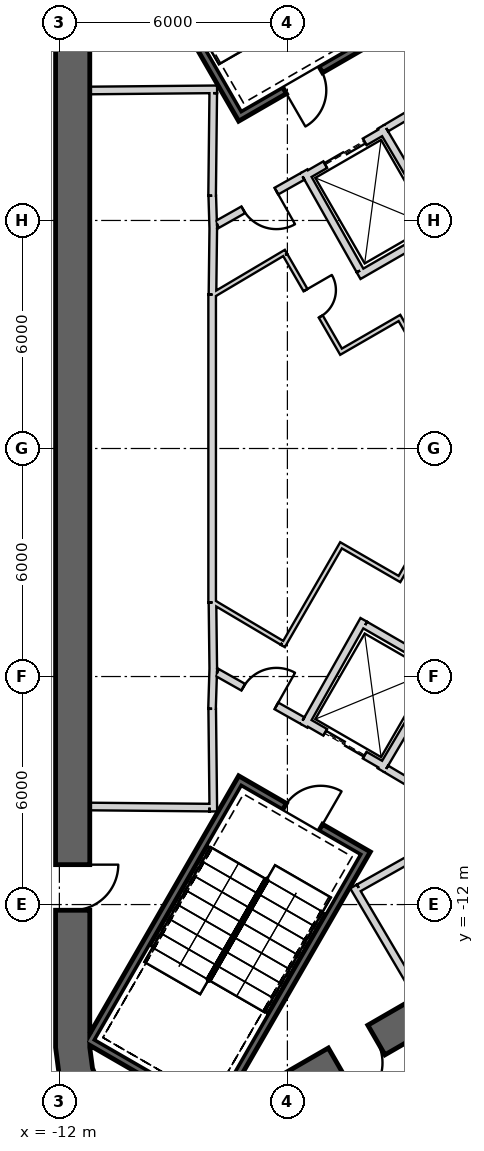
"""IFC4 building model, lengths in metres.
Left out: names, types, materials, properties, quantities, classifications, styles, units other than length and angle.
Written with IfcOpenShell. Run it as: python <this file> out.ifc"""

import sys

from ifc_helpers import new_model, si_unit, direction, frame, frame_2d, origin, place, context, subcontext, project, spatial, polyline, rectangle, outline, extrude, element, fill, save


model = new_model("IFC4")
c1 = context("Model", 3, precision=1e-05, world=origin(), true_north=direction((0.0, 1.0)))
c2 = subcontext(c1, "Body", "Model", "MODEL_VIEW")
j1 = project(units=[si_unit("LENGTHUNIT", "METRE"), si_unit("PLANEANGLEUNIT", "RADIAN")], contexts=[c1])
p1 = place(None, origin())
s1 = spatial("IfcSite", under=j1, at=p1, CompositionType="ELEMENT")
p2 = place(p1, origin())
s2 = spatial("IfcBuilding", under=s1, at=p2, CompositionType="ELEMENT")
p3 = place(p2, frame((0.0, 0.0, 39.5)))
s3 = spatial("IfcBuildingStorey", under=s2, at=p3, CompositionType="ELEMENT", Elevation=39.5)
p4 = place(p3, frame((19.475, 2.208, 0.0), z_axis=(0.0, 0.0, 1.0), x_axis=(-0.866028369851, 0.499994862586, 0.0)))
e1 = element("IfcWall", 1, at=p4, inside=s3, PredefinedType="SHEAR", context=c2, shape_type="SweptSolid", body=[
    extrude(rectangle(XDim=31.523, YDim=0.9, at=frame_2d((15.762, 0.0))), origin(), (0.0, 0.0, 1.0), 6.0),
])
p5 = place(p4, frame((3.612, 0.0, 0.0)))
e2 = element("IfcOpeningElement", 2, at=p5, cuts=e1, PredefinedType="OPENING", context=c2, shape_type="SweptSolid", body=[
    extrude(rectangle(XDim=1.2, YDim=2.4, at=frame_2d((0.6, 1.2))), frame((0.0, 0.46, 0.0), z_axis=(0.0, -1.0, 0.0), x_axis=(1.0, 0.0, 0.0)), (0.0, 0.0, 1.0), 0.92),
])
p6 = place(p4, frame((26.712, 0.0, 0.0)))
e3 = element("IfcOpeningElement", 3, at=p6, cuts=e1, PredefinedType="OPENING", context=c2, shape_type="SweptSolid", body=[
    extrude(rectangle(XDim=1.2, YDim=2.4, at=frame_2d((0.6, 1.2))), frame((0.0, 0.46, 0.0), z_axis=(0.0, -1.0, 0.0), x_axis=(1.0, 0.0, 0.0)), (0.0, 0.0, 1.0), 0.92),
])
p7 = place(p3, frame((-11.65, 15.762, 0.0), z_axis=(0.0, 0.0, 1.0), x_axis=(0.0, -1.0, 0.0)))
e4 = element("IfcWall", 4, at=p7, inside=s3, PredefinedType="SHEAR", context=c2, shape_type="SweptSolid", body=[
    extrude(rectangle(XDim=31.523, YDim=0.9, at=frame_2d((15.762, 0.0))), origin(), (0.0, 0.0, 1.0), 6.0),
])
p8 = place(p7, frame((3.612, 0.0, 0.0)))
e5 = element("IfcOpeningElement", 5, at=p8, cuts=e4, PredefinedType="OPENING", context=c2, shape_type="SweptSolid", body=[
    extrude(rectangle(XDim=1.2, YDim=2.4, at=frame_2d((0.6, 1.2))), frame((0.0, 0.46, 0.0), z_axis=(0.0, -1.0, 0.0), x_axis=(1.0, 0.0, 0.0)), (0.0, 0.0, 1.0), 0.92),
])
p9 = place(p7, frame((26.712, 0.0, 0.0)))
e6 = element("IfcOpeningElement", 6, at=p9, cuts=e4, PredefinedType="OPENING", context=c2, shape_type="SweptSolid", body=[
    extrude(rectangle(XDim=1.2, YDim=2.4, at=frame_2d((0.6, 1.2))), frame((0.0, 0.46, 0.0), z_axis=(0.0, -1.0, 0.0), x_axis=(1.0, 0.0, 0.0)), (0.0, 0.0, 1.0), 0.92),
])
p10 = place(p3, frame((-7.825, -17.97, 0.0), z_axis=(0.0, 0.0, 1.0), x_axis=(0.866028369851, 0.499994862586, 0.0)))
e7 = element("IfcWall", 7, at=p10, inside=s3, PredefinedType="SHEAR", context=c2, shape_type="SweptSolid", body=[
    extrude(rectangle(XDim=31.523, YDim=0.9, at=frame_2d((15.762, 0.0))), origin(), (0.0, 0.0, 1.0), 6.0),
])
p11 = place(p10, frame((26.712, 0.0, 0.0)))
e8 = element("IfcOpeningElement", 8, at=p11, cuts=e7, PredefinedType="OPENING", context=c2, shape_type="SweptSolid", body=[
    extrude(rectangle(XDim=1.2, YDim=2.4, at=frame_2d((0.6, 1.2))), frame((0.0, 0.46, 0.0), z_axis=(0.0, -1.0, 0.0), x_axis=(1.0, 0.0, 0.0)), (0.0, 0.0, 1.0), 0.92),
])
p12 = place(p10, frame((3.612, 0.0, 0.0)))
e9 = element("IfcOpeningElement", 9, at=p12, cuts=e7, PredefinedType="OPENING", context=c2, shape_type="SweptSolid", body=[
    extrude(rectangle(XDim=1.2, YDim=2.4, at=frame_2d((0.6, 1.2))), frame((0.0, 0.46, 0.0), z_axis=(0.0, -1.0, 0.0), x_axis=(1.0, 0.0, 0.0)), (0.0, 0.0, 1.0), 0.92),
])
p13 = place(p3, origin())
e10 = element("IfcWall", 10, at=p13, inside=s3, PredefinedType="SHEAR", context=c2, shape_type="SweptSolid", body=[
    extrude(outline(polyline([(-12.1, -15.762), (-11.998, -16.538), (-11.698, -17.262), (-11.221, -17.883), (-10.6, -18.36), (-9.876, -18.659), (-9.1, -18.762), (-8.323, -18.659), (-7.6, -18.36), (-8.05, -17.58), (-8.556, -17.79), (-9.1, -17.862), (-9.644, -17.79), (-10.15, -17.58), (-10.585, -17.247), (-10.919, -16.812), (-11.128, -16.305), (-11.2, -15.762), (-12.1, -15.762)])), origin(), (0.0, 0.0, 1.0), 6.0),
])
p14 = place(p3, frame((-4.859, -32.954, 0.0), z_axis=(0.0, 0.0, 1.0), x_axis=(0.865991780246, 0.500058233156, 0.0)))
e11 = element("IfcWall", 11, at=p14, inside=s3, PredefinedType="SOLIDWALL", context=c2, shape_type="SweptSolid", body=[
    extrude(rectangle(XDim=41.371, YDim=0.24, at=frame_2d((20.685, 0.0))), origin(), (0.0, 0.0, 1.0), 5.7),
])
p15 = place(p3, frame((-11.2, 9.42, 0.0), z_axis=(0.0, 0.0, 1.0), x_axis=(0.999957167047, 0.009255488683, 0.0)))
e12 = element("IfcWall", 12, at=p15, inside=s3, PredefinedType="PLUMBINGWALL", context=c2, shape_type="SweptSolid", body=[
    extrude(rectangle(XDim=3.35, YDim=0.2, at=frame_2d((1.675, 0.0))), origin(), (0.0, 0.0, 1.0), 5.7),
])
p16 = place(p3, frame((-7.951, 9.35, 0.0), z_axis=(0.0, 0.0, 1.0), x_axis=(-0.011120469654, -0.999938165666, 0.0)))
e13 = element("IfcWall", 13, at=p16, inside=s3, PredefinedType="PLUMBINGWALL", context=c2, shape_type="SweptSolid", body=[
    extrude(rectangle(XDim=2.7, YDim=0.2, at=frame_2d((1.35, 0.0))), origin(), (0.0, 0.0, 1.0), 5.7),
])
p17 = place(p3, frame((-7.977, 6.65, 0.0), z_axis=(0.0, 0.0, 1.0), x_axis=(0.030861509705, -0.999523670164, 0.0)))
e14 = element("IfcWall", 14, at=p17, inside=s3, PredefinedType="PLUMBINGWALL", context=c2, shape_type="SweptSolid", body=[
    extrude(rectangle(XDim=0.878, YDim=0.2, at=frame_2d((0.439, 0.0))), origin(), (0.0, 0.0, 1.0), 5.7),
])
p18 = place(p3, frame((-7.949, 5.895, 0.0), z_axis=(0.0, 0.0, 1.0), x_axis=(-0.012042535896, -0.999927486035, 0.0)))
e15 = element("IfcWall", 15, at=p18, inside=s3, PredefinedType="PLUMBINGWALL", context=c2, shape_type="SweptSolid", body=[
    extrude(rectangle(XDim=1.845, YDim=0.2, at=frame_2d((0.922, 0.0))), origin(), (0.0, 0.0, 1.0), 5.7),
])
p19 = place(p3, frame((-7.98, 4.05, 0.0), z_axis=(0.0, 0.0, 1.0), x_axis=(0.0, -1.0, 0.0)))
e16 = element("IfcWall", 16, at=p19, inside=s3, PredefinedType="PLUMBINGWALL", context=c2, shape_type="SweptSolid", body=[
    extrude(rectangle(XDim=8.1, YDim=0.2, at=frame_2d((4.05, 0.0))), origin(), (0.0, 0.0, 1.0), 5.7),
])
p20 = place(p3, frame((-7.95, -5.772, 0.0), z_axis=(0.0, 0.0, 1.0), x_axis=(-0.030803413295, -0.999525462272, 0.0)))
e17 = element("IfcWall", 17, at=p20, inside=s3, PredefinedType="PLUMBINGWALL", context=c2, shape_type="SweptSolid", body=[
    extrude(rectangle(XDim=1.078, YDim=0.2, at=frame_2d((0.539, 0.0))), origin(), (0.0, 0.0, 1.0), 5.7),
])
p21 = place(p3, frame((-7.971, -4.05, 0.0), z_axis=(0.0, 0.0, 1.0), x_axis=(0.012042535896, -0.999927486035, 0.0)))
e18 = element("IfcWall", 18, at=p21, inside=s3, PredefinedType="PLUMBINGWALL", context=c2, shape_type="SweptSolid", body=[
    extrude(rectangle(XDim=1.845, YDim=0.2, at=frame_2d((0.922, 0.0))), origin(), (0.0, 0.0, 1.0), 5.7),
])
p22 = place(p3, frame((-7.979, -6.85, 0.0), z_axis=(0.0, 0.0, 1.0), x_axis=(0.011121475088, -0.999938154483, 0.0)))
e19 = element("IfcWall", 19, at=p22, inside=s3, PredefinedType="PLUMBINGWALL", context=c2, shape_type="SweptSolid", body=[
    extrude(rectangle(XDim=2.7, YDim=0.2, at=frame_2d((1.35, 0.0))), origin(), (0.0, 0.0, 1.0), 5.7),
])
p23 = place(p3, frame((-8.05, -9.449, 0.0), z_axis=(0.0, 0.0, 1.0), x_axis=(-0.999957467379, 0.009222983926, 0.0)))
e20 = element("IfcWall", 20, at=p23, inside=s3, PredefinedType="PLUMBINGWALL", context=c2, shape_type="SweptSolid", body=[
    extrude(rectangle(XDim=3.15, YDim=0.2, at=frame_2d((1.575, 0.0))), origin(), (0.0, 0.0, 1.0), 5.7),
])
p24 = place(p3, frame((-4.296, 11.659, 0.0), z_axis=(0.0, 0.0, 1.0), x_axis=(0.871534483978, -0.490334215854, 0.0)))
e21 = element("IfcWall", 21, at=p24, inside=s3, PredefinedType="PLUMBINGWALL", context=c2, shape_type="SweptSolid", body=[
    extrude(rectangle(XDim=2.7, YDim=0.2, at=frame_2d((1.35, 0.0))), origin(), (0.0, 0.0, 1.0), 5.7),
])
p25 = place(p3, frame((-2.558, -14.409, 0.0), z_axis=(0.0, 0.0, 1.0), x_axis=(-0.507997497166, 0.861358544901, 0.0)))
e22 = element("IfcWall", 22, at=p25, inside=s3, PredefinedType="PLUMBINGWALL", context=c2, shape_type="SweptSolid", body=[
    extrude(rectangle(XDim=3.35, YDim=0.2, at=frame_2d((1.675, 0.0))), origin(), (0.0, 0.0, 1.0), 5.7),
])
p26 = place(p3, frame((-1.769, -10.237, 0.0), z_axis=(0.0, 0.0, 1.0), x_axis=(-0.871534483978, -0.490334215854, 0.0)))
e23 = element("IfcWall", 23, at=p26, inside=s3, PredefinedType="PLUMBINGWALL", context=c2, shape_type="SweptSolid", body=[
    extrude(rectangle(XDim=2.7, YDim=0.2, at=frame_2d((1.35, 0.0))), origin(), (0.0, 0.0, 1.0), 5.7),
])
p27 = place(p3, frame((-11.245, 15.678, -0.35), z_axis=(0.0, 0.0, 1.0), x_axis=(0.499977274689, -0.866038523851, 0.0)))
e24 = element("IfcWall", 24, at=p27, inside=s3, PredefinedType="SHEAR", context=c2, shape_type="SweptSolid", body=[
    extrude(rectangle(XDim=8.1, YDim=0.2, at=frame_2d((4.05, 0.0))), origin(), (0.0, 0.0, 1.0), 6.05),
])
p28 = place(p3, frame((-7.159, 8.8, -0.35), z_axis=(0.0, 0.0, 1.0), x_axis=(0.866047807691, 0.499961193289, 0.0)))
e25 = element("IfcWall", 25, at=p28, inside=s3, PredefinedType="SHEAR", context=c2, shape_type="SweptSolid", body=[
    extrude(rectangle(XDim=3.6, YDim=0.2, at=frame_2d((1.8, 0.0))), origin(), (0.0, 0.0, 1.0), 6.05),
])
p29 = place(p28, frame((1.25, 0.0, 0.35)))
e26 = element("IfcOpeningElement", 26, at=p29, cuts=e25, PredefinedType="OPENING", context=c2, shape_type="SweptSolid", body=[
    extrude(rectangle(XDim=1.1, YDim=2.1, at=frame_2d((0.55, 1.05))), frame((0.0, 0.11, 0.0), z_axis=(0.0, -1.0, 0.0), x_axis=(1.0, 0.0, 0.0)), (0.0, 0.0, 1.0), 0.22),
])
p30 = place(p3, frame((-5.524, 7.168, 0.0), z_axis=(0.0, 0.0, 1.0), x_axis=(0.866024647952, 0.500001309137, 0.0)))
e27 = element("IfcWall", 27, at=p30, inside=s3, PredefinedType="PLUMBINGWALL", context=c2, shape_type="SweptSolid", body=[
    extrude(rectangle(XDim=2.4, YDim=0.2, at=frame_2d((1.2, 0.0))), origin(), (0.0, 0.0, 1.0), 5.7),
])
p31 = place(p30, frame((0.6, 0.0, 0.0)))
e28 = element("IfcOpeningElement", 28, at=p31, cuts=e27, PredefinedType="OPENING", context=c2, shape_type="SweptSolid", body=[
    extrude(rectangle(XDim=1.2, YDim=2.4, at=frame_2d((0.6, 1.2))), frame((0.0, 0.11, 0.0), z_axis=(0.0, -1.0, 0.0), x_axis=(1.0, 0.0, 0.0)), (0.0, 0.0, 1.0), 0.22),
])
p32 = place(p3, frame((-3.538, 8.465, 0.0), z_axis=(0.0, 0.0, 1.0), x_axis=(0.508647062354, -0.860975125052, 0.0)))
e29 = element("IfcWall", 29, at=p32, inside=s3, PredefinedType="PLUMBINGWALL", context=c2, shape_type="SweptSolid", body=[
    extrude(rectangle(XDim=3.1, YDim=0.2, at=frame_2d((1.55, 0.0))), origin(), (0.0, 0.0, 1.0), 5.7),
])
p33 = place(p3, frame((-2.108, 5.711, 0.0), z_axis=(0.0, 0.0, 1.0), x_axis=(-0.866009305107, -0.50002788269, 0.0)))
e30 = element("IfcWall", 30, at=p33, inside=s3, PredefinedType="PLUMBINGWALL", context=c2, shape_type="SweptSolid", body=[
    extrude(rectangle(XDim=2.329, YDim=0.2, at=frame_2d((1.165, 0.0))), origin(), (0.0, 0.0, 1.0), 5.7),
])
p34 = place(p3, frame((-5.562, 7.296, 0.0), z_axis=(0.0, 0.0, 1.0), x_axis=(0.49134651263, -0.870964180966, 0.0)))
e31 = element("IfcWall", 31, at=p34, inside=s3, PredefinedType="PLUMBINGWALL", context=c2, shape_type="SweptSolid", body=[
    extrude(rectangle(XDim=3.0, YDim=0.2, at=frame_2d((1.5, 0.0))), origin(), (0.0, 0.0, 1.0), 5.7),
])
p35 = place(p3, frame((-3.905, -10.563, -0.35), z_axis=(0.0, 0.0, 1.0), x_axis=(-0.500012932018, -0.866017937352, 0.0)))
e32 = element("IfcWall", 32, at=p35, inside=s3, PredefinedType="SHEAR", context=c2, shape_type="SweptSolid", body=[
    extrude(rectangle(XDim=8.1, YDim=0.2, at=frame_2d((4.05, 0.0))), origin(), (0.0, 0.0, 1.0), 6.05),
])
p36 = place(p3, frame((-11.282, -15.541, -0.35), z_axis=(0.0, 0.0, 1.0), x_axis=(0.866000578957, -0.500042995397, 0.0)))
e33 = element("IfcWall", 33, at=p36, inside=s3, PredefinedType="SHEAR", context=c2, shape_type="SweptSolid", body=[
    extrude(rectangle(XDim=1.89, YDim=0.2, at=frame_2d((0.945, 0.0))), origin(), (0.0, 0.0, 1.0), 6.05),
])
p37 = place(p3, frame((-7.196, -8.663, -0.35), z_axis=(0.0, 0.0, 1.0), x_axis=(-0.499997992926, -0.866026562566, 0.0)))
e34 = element("IfcWall", 34, at=p37, inside=s3, PredefinedType="SHEAR", context=c2, shape_type="SweptSolid", body=[
    extrude(rectangle(XDim=7.9, YDim=0.2, at=frame_2d((3.95, 0.0))), origin(), (0.0, 0.0, 1.0), 6.05),
])
p38 = place(p3, frame((-4.041, -10.599, -0.35), z_axis=(0.0, 0.0, 1.0), x_axis=(-0.866047807691, 0.499961193289, 0.0)))
e35 = element("IfcWall", 35, at=p38, inside=s3, PredefinedType="SHEAR", context=c2, shape_type="SweptSolid", body=[
    extrude(rectangle(XDim=3.6, YDim=0.2, at=frame_2d((1.8, 0.0))), origin(), (0.0, 0.0, 1.0), 6.05),
])
p39 = place(p38, frame((1.25, 0.0, 0.35)))
e36 = element("IfcOpeningElement", 36, at=p39, cuts=e35, PredefinedType="OPENING", context=c2, shape_type="SweptSolid", body=[
    extrude(rectangle(XDim=1.1, YDim=2.1, at=frame_2d((0.55, 1.05))), frame((0.0, 0.11, 0.0), z_axis=(0.0, -1.0, 0.0), x_axis=(1.0, 0.0, 0.0)), (0.0, 0.0, 1.0), 0.22),
])
p40 = place(p3, frame((-3.446, -8.368, 0.0), z_axis=(0.0, 0.0, 1.0), x_axis=(-0.866024647952, 0.500001309137, 0.0)))
e37 = element("IfcWall", 37, at=p40, inside=s3, PredefinedType="PLUMBINGWALL", context=c2, shape_type="SweptSolid", body=[
    extrude(rectangle(XDim=2.4, YDim=0.2, at=frame_2d((1.2, 0.0))), origin(), (0.0, 0.0, 1.0), 5.7),
])
p41 = place(p40, frame((0.6, 0.0, 0.0)))
e38 = element("IfcOpeningElement", 38, at=p41, cuts=e37, PredefinedType="OPENING", context=c2, shape_type="SweptSolid", body=[
    extrude(rectangle(XDim=1.2, YDim=2.4, at=frame_2d((0.6, 1.2))), frame((0.0, 0.11, 0.0), z_axis=(0.0, -1.0, 0.0), x_axis=(1.0, 0.0, 0.0)), (0.0, 0.0, 1.0), 0.22),
])
p42 = place(p3, frame((-2.008, -5.878, 0.0), z_axis=(0.0, 0.0, 1.0), x_axis=(-0.508893526607, -0.860829471253, 0.0)))
e39 = element("IfcWall", 39, at=p42, inside=s3, PredefinedType="PLUMBINGWALL", context=c2, shape_type="SweptSolid", body=[
    extrude(rectangle(XDim=3.005, YDim=0.2, at=frame_2d((1.502, 0.0))), origin(), (0.0, 0.0, 1.0), 5.7),
])
p43 = place(p3, frame((-3.99, -4.509, 0.0), z_axis=(0.0, 0.0, 1.0), x_axis=(-0.491358283181, -0.870957540612, 0.0)))
e40 = element("IfcWall", 40, at=p43, inside=s3, PredefinedType="PLUMBINGWALL", context=c2, shape_type="SweptSolid", body=[
    extrude(rectangle(XDim=3.2, YDim=0.2, at=frame_2d((1.6, 0.0))), origin(), (0.0, 0.0, 1.0), 5.7),
])
p44 = place(p3, frame((-3.953, -4.646, 0.0), z_axis=(0.0, 0.0, 1.0), x_axis=(0.866060616833, -0.499939004251, 0.0)))
e41 = element("IfcWall", 41, at=p44, inside=s3, PredefinedType="PLUMBINGWALL", context=c2, shape_type="SweptSolid", body=[
    extrude(rectangle(XDim=2.115, YDim=0.2, at=frame_2d((1.057, 0.0))), origin(), (0.0, 0.0, 1.0), 5.7),
])
p45 = place(p3, frame((-1.18, 9.744, 0.0), z_axis=(0.0, 0.0, 1.0), x_axis=(-0.860615607571, -0.509255118781, 0.0)))
e42 = element("IfcWall", 42, at=p45, inside=s3, PredefinedType="PARTITIONING", context=c2, shape_type="SweptSolid", body=[
    extrude(rectangle(XDim=2.581, YDim=0.2, at=frame_2d((1.29, 0.0))), origin(), (0.0, 0.0, 1.0), 5.7),
])
p46 = place(p3, frame((-5.6, 7.16, 0.0), z_axis=(0.0, 0.0, 1.0), x_axis=(-0.871363259478, -0.490638431059, 0.0)))
e43 = element("IfcWall", 43, at=p46, inside=s3, PredefinedType="PARTITIONING", context=c2, shape_type="SweptSolid", body=[
    extrude(rectangle(XDim=2.581, YDim=0.2, at=frame_2d((1.291, 0.0))), origin(), (0.0, 0.0, 1.0), 5.7),
])
p47 = place(p46, frame((0.791, 0.0, 0.0)))
e44 = element("IfcOpeningElement", 44, at=p47, cuts=e43, PredefinedType="OPENING", context=c2, shape_type="SweptSolid", body=[
    extrude(rectangle(XDim=1.0, YDim=2.1, at=frame_2d((0.5, 1.05))), frame((0.0, 0.11, 0.0), z_axis=(0.0, -1.0, 0.0), x_axis=(1.0, 0.0, 0.0)), (0.0, 0.0, 1.0), 0.22),
])
p48 = place(p3, frame((-3.401, -8.43, 0.0), z_axis=(0.0, 0.0, 1.0), x_axis=(0.860615607571, -0.509255118781, 0.0)))
e45 = element("IfcWall", 45, at=p48, inside=s3, PredefinedType="PARTITIONING", context=c2, shape_type="SweptSolid", body=[
    extrude(rectangle(XDim=2.581, YDim=0.2, at=frame_2d((1.29, 0.0))), origin(), (0.0, 0.0, 1.0), 5.7),
])
p49 = place(p3, frame((-7.849, -5.894, 0.0), z_axis=(0.0, 0.0, 1.0), x_axis=(0.871363259478, -0.490638431059, 0.0)))
e46 = element("IfcWall", 46, at=p49, inside=s3, PredefinedType="PARTITIONING", context=c2, shape_type="SweptSolid", body=[
    extrude(rectangle(XDim=2.581, YDim=0.2, at=frame_2d((1.291, 0.0))), origin(), (0.0, 0.0, 1.0), 5.7),
])
p50 = place(p49, frame((0.791, 0.0, 0.0)))
e47 = element("IfcOpeningElement", 47, at=p50, cuts=e46, PredefinedType="OPENING", context=c2, shape_type="SweptSolid", body=[
    extrude(rectangle(XDim=1.0, YDim=2.1, at=frame_2d((0.5, 1.05))), frame((0.0, 0.11, 0.0), z_axis=(0.0, -1.0, 0.0), x_axis=(1.0, 0.0, 0.0)), (0.0, 0.0, 1.0), 0.22),
])
p51 = place(p3, frame((-6.037, 5.176, 0.0), z_axis=(0.0, 0.0, 1.0), x_axis=(-0.860106072674, -0.510115225953, 0.0)))
e48 = element("IfcWall", 48, at=p51, inside=s3, PredefinedType="PARTITIONING", context=c2, shape_type="SweptSolid", body=[
    extrude(rectangle(XDim=2.225, YDim=0.12, at=frame_2d((1.112, 0.0))), origin(), (0.0, 0.0, 1.0), 5.7),
])
p52 = place(p3, frame((-4.558, 2.495, 0.0), z_axis=(0.0, 0.0, 1.0), x_axis=(-0.499990139034, 0.866031096941, 0.0)))
e49 = element("IfcWall", 49, at=p52, inside=s3, PredefinedType="PARTITIONING", context=c2, shape_type="SweptSolid", body=[
    extrude(rectangle(XDim=3.0, YDim=0.12, at=frame_2d((1.5, 0.0))), origin(), (0.0, 0.0, 1.0), 5.7),
])
p53 = place(p52, frame((1.13, 0.0, 0.0)))
e50 = element("IfcOpeningElement", 50, at=p53, cuts=e49, PredefinedType="OPENING", context=c2, shape_type="SweptSolid", body=[
    extrude(rectangle(XDim=0.8, YDim=2.1, at=frame_2d((0.4, 1.05))), frame((0.0, 0.07, 0.0), z_axis=(0.0, -1.0, 0.0), x_axis=(1.0, 0.0, 0.0)), (0.0, 0.0, 1.0), 0.14),
])
p54 = place(p3, frame((-2.999, 3.465, 0.0), z_axis=(0.0, 0.0, 1.0), x_axis=(-0.866059624469, -0.499940723351, 0.0)))
e51 = element("IfcWall", 51, at=p54, inside=s3, PredefinedType="PARTITIONING", context=c2, shape_type="SweptSolid", body=[
    extrude(rectangle(XDim=1.775, YDim=0.12, at=frame_2d((0.888, 0.0))), origin(), (0.0, 0.0, 1.0), 5.7),
])
p55 = place(p3, frame((-1.594, 0.91, 0.0), z_axis=(0.0, 0.0, 1.0), x_axis=(-0.49997412077, 0.866040344649, 0.0)))
e52 = element("IfcWall", 52, at=p55, inside=s3, PredefinedType="PARTITIONING", context=c2, shape_type="SweptSolid", body=[
    extrude(rectangle(XDim=2.855, YDim=0.12, at=frame_2d((1.428, 0.0))), origin(), (0.0, 0.0, 1.0), 5.7),
])
p56 = place(p3, frame((-3.081, -3.487, 0.0), z_axis=(0.0, 0.0, 1.0), x_axis=(0.499986688891, 0.86603308882, 0.0)))
e53 = element("IfcWall", 53, at=p56, inside=s3, PredefinedType="PARTITIONING", context=c2, shape_type="SweptSolid", body=[
    extrude(rectangle(XDim=2.853, YDim=0.12, at=frame_2d((1.426, 0.0))), origin(), (0.0, 0.0, 1.0), 5.7),
])
p57 = place(p3, frame((-4.64, -2.517, 0.0), z_axis=(0.0, 0.0, 1.0), x_axis=(0.866025242659, -0.500000279077, 0.0)))
e54 = element("IfcWall", 54, at=p57, inside=s3, PredefinedType="PARTITIONING", context=c2, shape_type="SweptSolid", body=[
    extrude(rectangle(XDim=1.775, YDim=0.12, at=frame_2d((0.887, 0.0))), origin(), (0.0, 0.0, 1.0), 5.7),
])
p58 = place(p3, frame((-6.118, -5.197, 0.0), z_axis=(0.0, 0.0, 1.0), x_axis=(0.499990139034, 0.866031096941, 0.0)))
e55 = element("IfcWall", 55, at=p58, inside=s3, PredefinedType="PARTITIONING", context=c2, shape_type="SweptSolid", body=[
    extrude(rectangle(XDim=3.0, YDim=0.12, at=frame_2d((1.5, 0.0))), origin(), (0.0, 0.0, 1.0), 5.7),
])
p59 = place(p3, frame((-7.95, -4.041, 0.0), z_axis=(0.0, 0.0, 1.0), x_axis=(0.860112457103, -0.510104461004, 0.0)))
e56 = element("IfcWall", 56, at=p59, inside=s3, PredefinedType="PARTITIONING", context=c2, shape_type="SweptSolid", body=[
    extrude(rectangle(XDim=2.104, YDim=0.12, at=frame_2d((1.052, 0.0))), origin(), (0.0, 0.0, 1.0), 5.7),
])
p60 = place(p29, origin())
e57 = element("IfcDoor", 57, at=p60, inside=s3, OperationType="SINGLE_SWING_LEFT", PredefinedType="USERDEFINED", context=c2, shape_type="SweptSolid", body=[
    extrude(rectangle(XDim=1.1, YDim=2.1, at=frame_2d((0.55, 1.05))), frame((0.0, 0.025, 0.0), z_axis=(0.0, -1.0, 0.0), x_axis=(1.0, 0.0, 0.0)), (0.0, 0.0, 1.0), 0.05),
])
fill(e26, e57)
p61 = place(p47, origin())
e58 = element("IfcDoor", 58, at=p61, inside=s3, OperationType="SINGLE_SWING_LEFT", PredefinedType="USERDEFINED", context=c2, shape_type="SweptSolid", body=[
    extrude(rectangle(XDim=1.0, YDim=2.1, at=frame_2d((0.5, 1.05))), frame((0.0, 0.025, 0.0), z_axis=(0.0, -1.0, 0.0), x_axis=(1.0, 0.0, 0.0)), (0.0, 0.0, 1.0), 0.05),
])
fill(e44, e58)
p62 = place(p31, origin())
e59 = element("IfcDoor", 59, at=p62, inside=s3, OperationType="SLIDING_TO_LEFT", PredefinedType="USERDEFINED", context=c2, shape_type="SweptSolid", body=[
    extrude(rectangle(XDim=1.2, YDim=2.4, at=frame_2d((0.6, 1.2))), frame((0.0, 0.025, 0.0), z_axis=(0.0, -1.0, 0.0), x_axis=(1.0, 0.0, 0.0)), (0.0, 0.0, 1.0), 0.05),
])
fill(e28, e59)
p63 = place(p39, origin())
e60 = element("IfcDoor", 60, at=p63, inside=s3, OperationType="SINGLE_SWING_LEFT", PredefinedType="USERDEFINED", context=c2, shape_type="SweptSolid", body=[
    extrude(rectangle(XDim=1.1, YDim=2.1, at=frame_2d((0.55, 1.05))), frame((0.0, 0.025, 0.0), z_axis=(0.0, -1.0, 0.0), x_axis=(1.0, 0.0, 0.0)), (0.0, 0.0, 1.0), 0.05),
])
fill(e36, e60)
p64 = place(p50, origin())
e61 = element("IfcDoor", 61, at=p64, inside=s3, OperationType="SINGLE_SWING_RIGHT", PredefinedType="USERDEFINED", context=c2, shape_type="SweptSolid", body=[
    extrude(rectangle(XDim=1.0, YDim=2.1, at=frame_2d((0.5, 1.05))), frame((0.0, 0.025, 0.0), z_axis=(0.0, -1.0, 0.0), x_axis=(1.0, 0.0, 0.0)), (0.0, 0.0, 1.0), 0.05),
])
fill(e47, e61)
p65 = place(p41, origin())
e62 = element("IfcDoor", 62, at=p65, inside=s3, OperationType="SLIDING_TO_LEFT", PredefinedType="USERDEFINED", context=c2, shape_type="SweptSolid", body=[
    extrude(rectangle(XDim=1.2, YDim=2.4, at=frame_2d((0.6, 1.2))), frame((0.0, 0.025, 0.0), z_axis=(0.0, -1.0, 0.0), x_axis=(1.0, 0.0, 0.0)), (0.0, 0.0, 1.0), 0.05),
])
fill(e38, e62)
p66 = place(p53, origin())
e63 = element("IfcDoor", 63, at=p66, inside=s3, OperationType="SINGLE_SWING_RIGHT", PredefinedType="USERDEFINED", context=c2, shape_type="SweptSolid", body=[
    extrude(rectangle(XDim=0.8, YDim=2.1, at=frame_2d((0.4, 1.05))), frame((0.0, 0.025, 0.0), z_axis=(0.0, -1.0, 0.0), x_axis=(1.0, 0.0, 0.0)), (0.0, 0.0, 1.0), 0.05),
])
fill(e50, e63)
p67 = place(p9, origin())
e64 = element("IfcDoor", 64, at=p67, inside=s3, OperationType="SINGLE_SWING_LEFT", PredefinedType="USERDEFINED", context=c2, shape_type="SweptSolid", body=[
    extrude(rectangle(XDim=1.2, YDim=2.4, at=frame_2d((0.6, 1.2))), frame((0.0, 0.025, 0.0), z_axis=(0.0, -1.0, 0.0), x_axis=(1.0, 0.0, 0.0)), (0.0, 0.0, 1.0), 0.05),
])
fill(e6, e64)
p68 = place(p12, origin())
e65 = element("IfcDoor", 65, at=p68, inside=s3, OperationType="SINGLE_SWING_LEFT", PredefinedType="USERDEFINED", context=c2, shape_type="SweptSolid", body=[
    extrude(rectangle(XDim=1.2, YDim=2.4, at=frame_2d((0.6, 1.2))), frame((0.0, 0.025, 0.0), z_axis=(0.0, -1.0, 0.0), x_axis=(1.0, 0.0, 0.0)), (0.0, 0.0, 1.0), 0.05),
])
fill(e9, e65)
save(model, sys.argv[1])
